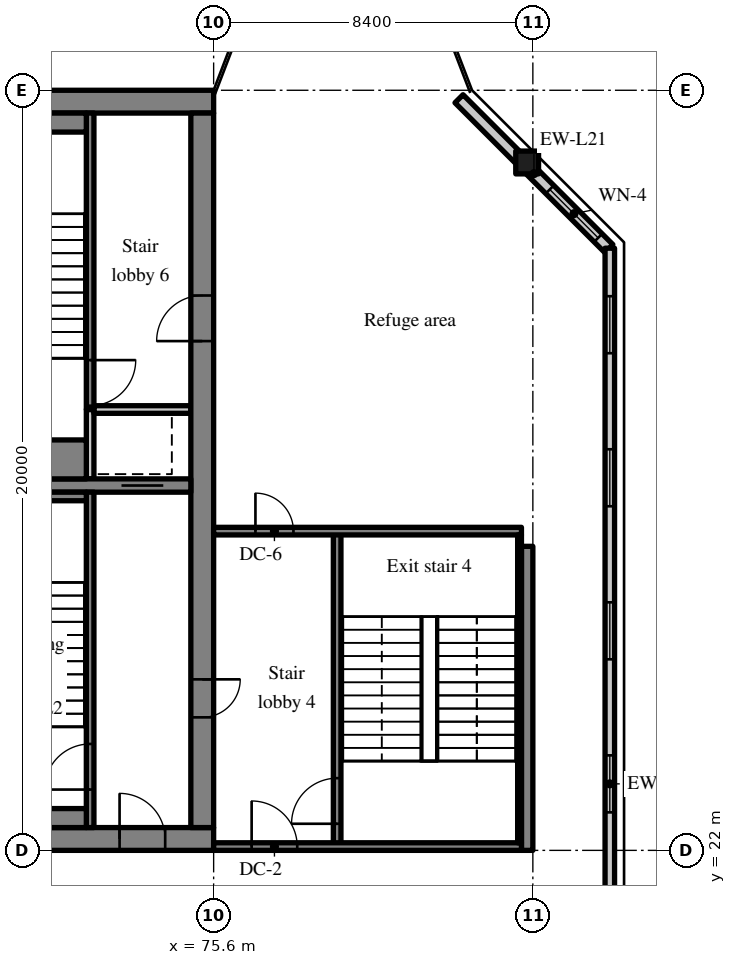
"""IFC4 building model, lengths in metres.
Left out: names, types, materials, properties, quantities, classifications, styles, units other than length and angle.
Written with IfcOpenShell. Run it as: python <this file> out.ifc"""

import sys

from ifc_helpers import new_model, si_unit, direction, frame, frame_2d, origin, origin_2d, place, context, subcontext, project, spatial, rectangle, extrude, source, transform, mapped, element, fill, save


model = new_model("IFC4")
c1 = context("Model", 3, precision=1e-05, world=origin(), true_north=direction((0.0, 1.0)))
c2 = subcontext(c1, "Body", "Model", "MODEL_VIEW")
j1 = project(units=[si_unit("LENGTHUNIT", "METRE"), si_unit("PLANEANGLEUNIT", "RADIAN")], contexts=[c1])
p1 = place(None, origin())
s1 = spatial("IfcSite", under=j1, at=p1, CompositionType="ELEMENT")
p2 = place(p1, origin())
s2 = spatial("IfcBuilding", under=s1, at=p2, CompositionType="ELEMENT")
p3 = place(p2, frame((0.0, 0.0, 221.8)))
s3 = spatial("IfcBuildingStorey", under=s2, at=p3, CompositionType="ELEMENT", Elevation=221.8)
m1 = source(origin(), c2, "Body", "SweptSolid", [
    extrude(rectangle(XDim=50.4, YDim=0.6, at=frame_2d((25.2, 0.0))), origin(), (0.0, 0.0, 1.0), 3.62),
])
p4 = place(p3, frame((25.2, 22.3, 0.0), z_axis=(0.0, 0.0, 1.0), x_axis=(1.0, 0.0, 0.0)))
e1 = element("IfcWall", 1, at=p4, inside=s3, PredefinedType="SHEAR", context=c2, shape_type="MappedRepresentation", body=[
    mapped(m1, transform((0.0, 0.0, 0.0), scale=1.0)),
])
m2 = source(origin(), c2, "Body", "SweptSolid", [
    extrude(rectangle(XDim=1.8, YDim=2.1, at=frame_2d((0.9, 1.05))), frame((0.0, 0.31, 0.0), z_axis=(0.0, -1.0, 0.0), x_axis=(1.0, 0.0, 0.0)), (0.0, 0.0, 1.0), 0.62),
])
p5 = place(p4, frame((15.9, 0.0, 0.0)))
e2 = element("IfcOpeningElement", 2, at=p5, cuts=e1, PredefinedType="OPENING", context=c2, shape_type="MappedRepresentation", body=[
    mapped(m2, transform((0.0, 0.0, 0.0), scale=1.0)),
])
m3 = source(origin(), c2, "Body", "SweptSolid", [
    extrude(rectangle(XDim=0.9, YDim=2.1, at=frame_2d((0.45, 1.05))), frame((0.0, 0.31, 0.0), z_axis=(0.0, -1.0, 0.0), x_axis=(1.0, 0.0, 0.0)), (0.0, 0.0, 1.0), 0.62),
])
p6 = place(p4, frame((9.687, 0.0, 0.0)))
e3 = element("IfcOpeningElement", 3, at=p6, cuts=e1, PredefinedType="OPENING", context=c2, shape_type="MappedRepresentation", body=[
    mapped(m3, transform((0.0, 0.0, 0.0), scale=1.0)),
])
p7 = place(p4, frame((21.513, 0.0, 0.0)))
e4 = element("IfcOpeningElement", 4, at=p7, cuts=e1, PredefinedType="OPENING", context=c2, shape_type="MappedRepresentation", body=[
    mapped(m3, transform((0.0, 0.0, 0.0), scale=1.0)),
])
p8 = place(p4, frame((32.7, 0.0, 0.0)))
e5 = element("IfcOpeningElement", 5, at=p8, cuts=e1, PredefinedType="OPENING", context=c2, shape_type="MappedRepresentation", body=[
    mapped(m2, transform((0.0, 0.0, 0.0), scale=1.0)),
])
m4 = source(origin(), c2, "Body", "SweptSolid", [
    extrude(rectangle(XDim=1.2, YDim=2.1, at=frame_2d((0.6, 1.05))), frame((0.0, 0.31, 0.0), z_axis=(0.0, -1.0, 0.0), x_axis=(1.0, 0.0, 0.0)), (0.0, 0.0, 1.0), 0.62),
])
p9 = place(p4, frame((6.488, 0.0, 0.0)))
e6 = element("IfcOpeningElement", 6, at=p9, cuts=e1, PredefinedType="OPENING", context=c2, shape_type="MappedRepresentation", body=[
    mapped(m4, transform((0.0, 0.0, 0.0), scale=1.0)),
])
p10 = place(p4, frame((47.925, 0.0, 0.0)))
e7 = element("IfcOpeningElement", 7, at=p10, cuts=e1, PredefinedType="OPENING", context=c2, shape_type="MappedRepresentation", body=[
    mapped(m4, transform((0.0, 0.0, 0.0), scale=1.0)),
])
p11 = place(p3, frame((25.2, 41.7, 0.0), z_axis=(0.0, 0.0, 1.0), x_axis=(1.0, 0.0, 0.0)))
e8 = element("IfcWall", 8, at=p11, inside=s3, PredefinedType="SHEAR", context=c2, shape_type="MappedRepresentation", body=[
    mapped(m1, transform((0.0, 0.0, 0.0), scale=1.0)),
])
m5 = source(origin(), c2, "Body", "SweptSolid", [
    extrude(rectangle(XDim=18.8, YDim=0.6, at=frame_2d((9.4, 0.0))), origin(), (0.0, 0.0, 1.0), 3.62),
])
p12 = place(p3, frame((75.3, 22.6, 0.0), z_axis=(0.0, 0.0, 1.0), x_axis=(0.0, 1.0, 0.0)))
e9 = element("IfcWall", 9, at=p12, inside=s3, PredefinedType="SHEAR", context=c2, shape_type="MappedRepresentation", body=[
    mapped(m5, transform((0.0, 0.0, 0.0), scale=1.0)),
])
m6 = source(origin(), c2, "Body", "SweptSolid", [
    extrude(rectangle(XDim=1.0, YDim=2.1, at=frame_2d((0.5, 1.05))), frame((0.0, 0.31, 0.0), z_axis=(0.0, -1.0, 0.0), x_axis=(1.0, 0.0, 0.0)), (0.0, 0.0, 1.0), 0.62),
])
p13 = place(p12, frame((2.9, 0.0, 0.0)))
e10 = element("IfcOpeningElement", 10, at=p13, cuts=e9, PredefinedType="OPENING", context=c2, shape_type="MappedRepresentation", body=[
    mapped(m6, transform((0.0, 0.0, 0.0), scale=1.0)),
])
p14 = place(p12, frame((12.8, 0.0, 0.0)))
e11 = element("IfcOpeningElement", 11, at=p14, cuts=e9, PredefinedType="OPENING", context=c2, shape_type="MappedRepresentation", body=[
    mapped(m4, transform((0.0, 0.0, 0.0), scale=1.0)),
])
m7 = source(origin(), c2, "Body", "SweptSolid", [
    extrude(rectangle(XDim=7.625, YDim=0.35, at=frame_2d((3.812, 0.0))), origin(), (0.0, 0.0, 1.0), 3.62),
])
p15 = place(p3, frame((67.375, 31.6, 0.0), z_axis=(0.0, 0.0, 1.0), x_axis=(1.0, 0.0, 0.0)))
e12 = element("IfcWall", 12, at=p15, inside=s3, PredefinedType="SHEAR", context=c2, shape_type="MappedRepresentation", body=[
    mapped(m7, transform((0.0, 0.0, 0.0), scale=1.0)),
])
m8 = source(origin(), c2, "Body", "SweptSolid", [
    extrude(rectangle(XDim=1.1, YDim=2.1, at=frame_2d((0.55, 1.05))), frame((0.0, 0.185, 0.0), z_axis=(0.0, -1.0, 0.0), x_axis=(1.0, 0.0, 0.0)), (0.0, 0.0, 1.0), 0.37),
])
p16 = place(p15, frame((5.8, 0.0, 0.0)))
e13 = element("IfcOpeningElement", 13, at=p16, cuts=e12, PredefinedType="OPENING", context=c2, shape_type="MappedRepresentation", body=[
    mapped(m8, transform((0.0, 0.0, 0.0), scale=1.0)),
])
m9 = source(origin(), c2, "Body", "SweptSolid", [
    extrude(rectangle(XDim=8.0, YDim=0.3, at=frame_2d((4.0, 0.0))), origin(), (0.0, 0.0, 1.0), 3.62),
])
p17 = place(p3, frame((83.85, 22.0, 0.0), z_axis=(0.0, 0.0, 1.0), x_axis=(0.0, 1.0, 0.0)))
e14 = element("IfcWall", 14, at=p17, inside=s3, PredefinedType="SHEAR", context=c2, shape_type="MappedRepresentation", body=[
    mapped(m9, transform((0.0, 0.0, 0.0), scale=1.0)),
])
m10 = source(origin(), c2, "Body", "SweptSolid", [
    extrude(rectangle(XDim=0.6, YDim=0.6, at=origin_2d()), origin(), (0.0, 0.0, 1.0), 3.62),
])
p18 = place(p3, frame((83.85, 40.1, 0.0), z_axis=(0.0, 0.0, 1.0), x_axis=(1.0, 0.0, 0.0)))
e15 = element("IfcColumn", 15, at=p18, inside=s3, PredefinedType="COLUMN", context=c2, shape_type="MappedRepresentation", body=[
    mapped(m10, transform((0.0, 0.0, 0.0), scale=1.0)),
])
m11 = source(origin(), c2, "Body", "SweptSolid", [
    extrude(rectangle(XDim=5.576, YDim=0.3, at=frame_2d((2.788, 0.0))), origin(), (0.0, 0.0, 1.0), 3.62),
])
p19 = place(p3, frame((86.0, 37.834, 0.0), z_axis=(0.0, 0.0, 1.0), x_axis=(-0.707106781187, 0.707106781187, 0.0)))
e16 = element("IfcWall", 16, at=p19, inside=s3, PredefinedType="SOLIDWALL", context=c2, shape_type="MappedRepresentation", body=[
    mapped(m11, transform((0.0, 0.0, 0.0), scale=1.0)),
])
m12 = source(origin(), c2, "Body", "SweptSolid", [
    extrude(rectangle(XDim=1.8, YDim=1.5, at=frame_2d((0.9, 0.75))), frame((0.0, 0.16, 0.0), z_axis=(0.0, -1.0, 0.0), x_axis=(1.0, 0.0, 0.0)), (0.0, 0.0, 1.0), 0.32),
])
p20 = place(p19, frame((0.399, 0.0, 0.9)))
e17 = element("IfcOpeningElement", 17, at=p20, cuts=e16, PredefinedType="OPENING", context=c2, shape_type="MappedRepresentation", body=[
    mapped(m12, transform((0.0, 0.0, 0.0), scale=1.0)),
])
m13 = source(origin(), c2, "Body", "SweptSolid", [
    extrude(rectangle(XDim=28.189, YDim=0.25, at=frame_2d((14.095, 0.0))), origin(), (0.0, 0.0, 1.0), 3.62),
])
p21 = place(p3, frame((86.025, 9.655, 0.0), z_axis=(0.0, 0.0, 1.0), x_axis=(0.0, 1.0, 0.0)))
e18 = element("IfcWall", 18, at=p21, inside=s3, PredefinedType="SOLIDWALL", context=c2, shape_type="MappedRepresentation", body=[
    mapped(m13, transform((0.0, 0.0, 0.0), scale=1.0)),
])
m14 = source(origin(), c2, "Body", "SweptSolid", [
    extrude(rectangle(XDim=1.5, YDim=1.5, at=frame_2d((0.75, 0.75))), frame((0.0, 0.135, 0.0), z_axis=(0.0, -1.0, 0.0), x_axis=(1.0, 0.0, 0.0)), (0.0, 0.0, 1.0), 0.27),
])
p22 = place(p21, frame((1.263, 0.0, 0.9)))
e19 = element("IfcOpeningElement", 19, at=p22, cuts=e18, PredefinedType="OPENING", context=c2, shape_type="MappedRepresentation", body=[
    mapped(m14, transform((0.0, 0.0, 0.0), scale=1.0)),
])
p23 = place(p21, frame((5.291, 0.0, 0.9)))
e20 = element("IfcOpeningElement", 20, at=p23, cuts=e18, PredefinedType="OPENING", context=c2, shape_type="MappedRepresentation", body=[
    mapped(m14, transform((0.0, 0.0, 0.0), scale=1.0)),
])
p24 = place(p21, frame((9.318, 0.0, 0.9)))
e21 = element("IfcOpeningElement", 21, at=p24, cuts=e18, PredefinedType="OPENING", context=c2, shape_type="MappedRepresentation", body=[
    mapped(m14, transform((0.0, 0.0, 0.0), scale=1.0)),
])
p25 = place(p21, frame((13.345, 0.0, 0.9)))
e22 = element("IfcOpeningElement", 22, at=p25, cuts=e18, PredefinedType="OPENING", context=c2, shape_type="MappedRepresentation", body=[
    mapped(m14, transform((0.0, 0.0, 0.0), scale=1.0)),
])
p26 = place(p21, frame((17.372, 0.0, 0.9)))
e23 = element("IfcOpeningElement", 23, at=p26, cuts=e18, PredefinedType="OPENING", context=c2, shape_type="MappedRepresentation", body=[
    mapped(m14, transform((0.0, 0.0, 0.0), scale=1.0)),
])
p27 = place(p21, frame((21.399, 0.0, 0.9)))
e24 = element("IfcOpeningElement", 24, at=p27, cuts=e18, PredefinedType="OPENING", context=c2, shape_type="MappedRepresentation", body=[
    mapped(m14, transform((0.0, 0.0, 0.0), scale=1.0)),
])
p28 = place(p21, frame((25.426, 0.0, 0.9)))
e25 = element("IfcOpeningElement", 25, at=p28, cuts=e18, PredefinedType="OPENING", context=c2, shape_type="MappedRepresentation", body=[
    mapped(m14, transform((0.0, 0.0, 0.0), scale=1.0)),
])
m15 = source(origin(), c2, "Body", "SweptSolid", [
    extrude(rectangle(XDim=8.825, YDim=0.2, at=frame_2d((4.413, 0.0))), origin(), (0.0, 0.0, 1.0), 3.62),
])
p29 = place(p3, frame((72.35, 22.6, 0.0), z_axis=(0.0, 0.0, 1.0), x_axis=(0.0, 1.0, 0.0)))
e26 = element("IfcWall", 26, at=p29, inside=s3, PredefinedType="SOLIDWALL", context=c2, shape_type="MappedRepresentation", body=[
    mapped(m15, transform((0.0, 0.0, 0.0), scale=1.0)),
])
m16 = source(origin(), c2, "Body", "SweptSolid", [
    extrude(rectangle(XDim=1.2, YDim=2.1, at=frame_2d((0.6, 1.05))), frame((0.0, 0.11, 0.0), z_axis=(0.0, -1.0, 0.0), x_axis=(1.0, 0.0, 0.0)), (0.0, 0.0, 1.0), 0.22),
])
p30 = place(p29, frame((1.0, 0.0, 0.0)))
e27 = element("IfcOpeningElement", 27, at=p30, cuts=e26, PredefinedType="OPENING", context=c2, shape_type="MappedRepresentation", body=[
    mapped(m16, transform((0.0, 0.0, 0.0), scale=1.0)),
])
m17 = source(origin(), c2, "Body", "SweptSolid", [
    extrude(rectangle(XDim=1.825, YDim=0.2, at=frame_2d((0.913, 0.0))), origin(), (0.0, 0.0, 1.0), 3.62),
])
p31 = place(p3, frame((72.35, 31.775, 0.0), z_axis=(0.0, 0.0, 1.0), x_axis=(0.0, 1.0, 0.0)))
e28 = element("IfcWall", 28, at=p31, inside=s3, PredefinedType="SOLIDWALL", context=c2, shape_type="MappedRepresentation", body=[
    mapped(m17, transform((0.0, 0.0, 0.0), scale=1.0)),
])
m18 = source(origin(), c2, "Body", "SweptSolid", [
    extrude(rectangle(XDim=2.55, YDim=0.2, at=frame_2d((1.275, 0.0))), origin(), (0.0, 0.0, 1.0), 3.62),
])
p32 = place(p3, frame((72.45, 33.6, 0.0), z_axis=(0.0, 0.0, 1.0), x_axis=(1.0, 0.0, 0.0)))
e29 = element("IfcWall", 29, at=p32, inside=s3, PredefinedType="SOLIDWALL", context=c2, shape_type="MappedRepresentation", body=[
    mapped(m18, transform((0.0, 0.0, 0.0), scale=1.0)),
])
m19 = source(origin(), c2, "Body", "SweptSolid", [
    extrude(rectangle(XDim=7.8, YDim=0.2, at=frame_2d((3.9, 0.0))), origin(), (0.0, 0.0, 1.0), 3.62),
])
p33 = place(p3, frame((72.35, 33.6, 0.0), z_axis=(0.0, 0.0, 1.0), x_axis=(0.0, 1.0, 0.0)))
e30 = element("IfcWall", 30, at=p33, inside=s3, PredefinedType="SOLIDWALL", context=c2, shape_type="MappedRepresentation", body=[
    mapped(m19, transform((0.0, 0.0, 0.0), scale=1.0)),
])
p34 = place(p33, frame((0.1, 0.0, 0.0)))
e31 = element("IfcOpeningElement", 31, at=p34, cuts=e30, PredefinedType="OPENING", context=c2, shape_type="MappedRepresentation", body=[
    mapped(m16, transform((0.0, 0.0, 0.0), scale=1.0)),
])
m20 = source(origin(), c2, "Body", "SweptSolid", [
    extrude(rectangle(XDim=8.3, YDim=0.2, at=frame_2d((4.15, 0.0))), origin(), (0.0, 0.0, 1.0), 3.62),
])
p35 = place(p3, frame((78.85, 22.1, 0.0), z_axis=(0.0, 0.0, 1.0), x_axis=(0.0, 1.0, 0.0)))
e32 = element("IfcWall", 32, at=p35, inside=s3, PredefinedType="SOLIDWALL", context=c2, shape_type="MappedRepresentation", body=[
    mapped(m20, transform((0.0, 0.0, 0.0), scale=1.0)),
])
p36 = place(p35, frame((0.6, 0.0, 0.0)))
e33 = element("IfcOpeningElement", 33, at=p36, cuts=e32, PredefinedType="OPENING", context=c2, shape_type="MappedRepresentation", body=[
    mapped(m16, transform((0.0, 0.0, 0.0), scale=1.0)),
])
m21 = source(origin(), c2, "Body", "SweptSolid", [
    extrude(rectangle(XDim=8.1, YDim=0.2, at=frame_2d((4.05, 0.0))), origin(), (0.0, 0.0, 1.0), 3.62),
])
p37 = place(p3, frame((83.7, 22.1, 0.0), z_axis=(0.0, 0.0, 1.0), x_axis=(-1.0, 0.0, 0.0)))
e34 = element("IfcWall", 34, at=p37, inside=s3, PredefinedType="SOLIDWALL", context=c2, shape_type="MappedRepresentation", body=[
    mapped(m21, transform((0.0, 0.0, 0.0), scale=1.0)),
])
p38 = place(p37, frame((5.9, 0.0, 0.0)))
e35 = element("IfcOpeningElement", 35, at=p38, cuts=e34, PredefinedType="OPENING", context=c2, shape_type="MappedRepresentation", body=[
    mapped(m16, transform((0.0, 0.0, 0.0), scale=1.0)),
])
p39 = place(p3, frame((83.7, 30.4, 0.0), z_axis=(0.0, 0.0, 1.0), x_axis=(-1.0, 0.0, 0.0)))
e36 = element("IfcWall", 36, at=p39, inside=s3, PredefinedType="SOLIDWALL", context=c2, shape_type="MappedRepresentation", body=[
    mapped(m21, transform((0.0, 0.0, 0.0), scale=1.0)),
])
m22 = source(origin(), c2, "Body", "SweptSolid", [
    extrude(rectangle(XDim=1.0, YDim=2.1, at=frame_2d((0.5, 1.05))), frame((0.0, 0.11, 0.0), z_axis=(0.0, -1.0, 0.0), x_axis=(1.0, 0.0, 0.0)), (0.0, 0.0, 1.0), 0.22),
])
p40 = place(p39, frame((6.0, 0.0, 0.0)))
e37 = element("IfcOpeningElement", 37, at=p40, cuts=e36, PredefinedType="OPENING", context=c2, shape_type="MappedRepresentation", body=[
    mapped(m22, transform((0.0, 0.0, 0.0), scale=1.0)),
])
m23 = source(origin(), c2, "Body", "SweptSolid", [
    extrude(rectangle(XDim=4.875, YDim=0.5, at=frame_2d((2.438, 0.0))), origin(), (0.0, 0.0, 1.0), 3.62),
])
p41 = place(p3, frame((67.375, 22.85, 0.0), z_axis=(0.0, 0.0, 1.0), x_axis=(1.0, 0.0, 0.0)))
e38 = element("IfcWall", 38, at=p41, inside=s3, PredefinedType="SOLIDWALL", context=c2, shape_type="MappedRepresentation", body=[
    mapped(m23, transform((0.0, 0.0, 0.0), scale=1.0)),
])
m24 = source(origin(), c2, "Body", "SweptSolid", [
    extrude(rectangle(XDim=4.875, YDim=0.225, at=frame_2d((2.438, 0.0))), origin(), (0.0, 0.0, 1.0), 3.62),
])
p42 = place(p3, frame((67.375, 31.312, 0.0), z_axis=(0.0, 0.0, 1.0), x_axis=(1.0, 0.0, 0.0)))
e39 = element("IfcWall", 39, at=p42, inside=s3, PredefinedType="SOLIDWALL", context=c2, shape_type="MappedRepresentation", body=[
    mapped(m24, transform((0.0, 0.0, 0.0), scale=1.0)),
])
p43 = place(p3, frame((67.375, 41.15, 0.0), z_axis=(0.0, 0.0, 1.0), x_axis=(1.0, 0.0, 0.0)))
e40 = element("IfcWall", 40, at=p43, inside=s3, PredefinedType="SOLIDWALL", context=c2, shape_type="MappedRepresentation", body=[
    mapped(m23, transform((0.0, 0.0, 0.0), scale=1.0)),
])
m25 = source(origin(), c2, "Body", "SweptSolid", [
    extrude(rectangle(XDim=4.875, YDim=1.025, at=frame_2d((2.438, 0.0))), origin(), (0.0, 0.0, 1.0), 3.62),
])
p44 = place(p3, frame((67.375, 32.287, 0.0), z_axis=(0.0, 0.0, 1.0), x_axis=(1.0, 0.0, 0.0)))
e41 = element("IfcWall", 41, at=p44, inside=s3, PredefinedType="SOLIDWALL", context=c2, shape_type="MappedRepresentation", body=[
    mapped(m25, transform((0.0, 0.0, 0.0), scale=1.0)),
])
m26 = source(origin(), c2, "Body", "SweptSolid", [
    extrude(rectangle(XDim=8.1, YDim=0.1, at=frame_2d((4.05, 0.0))), origin(), (0.0, 0.0, 1.0), 3.62),
])
p45 = place(p3, frame((83.65, 22.2, 0.0), z_axis=(0.0, 0.0, 1.0), x_axis=(0.0, 1.0, 0.0)))
e42 = element("IfcWall", 42, at=p45, inside=s3, PredefinedType="SOLIDWALL", context=c2, shape_type="MappedRepresentation", body=[
    mapped(m26, transform((0.0, 0.0, 0.0), scale=1.0)),
])
m27 = source(origin(), c2, "Body", "SweptSolid", [
    extrude(rectangle(XDim=1.8, YDim=1.5, at=frame_2d((0.9, 0.75))), frame((0.0, 0.03, 0.0), z_axis=(0.0, -1.0, 0.0), x_axis=(1.0, 0.0, 0.0)), (0.0, 0.0, 1.0), 0.06),
])
p46 = place(p20, origin())
e43 = element("IfcWindow", 43, at=p46, inside=s3, PartitioningType="SINGLE_PANEL", PredefinedType="WINDOW", context=c2, shape_type="MappedRepresentation", body=[
    mapped(m27, transform((0.0, 0.0, 0.0), scale=1.0)),
])
fill(e17, e43)
m28 = source(origin(), c2, "Body", "SweptSolid", [
    extrude(rectangle(XDim=1.5, YDim=1.5, at=frame_2d((0.75, 0.75))), frame((0.0, 0.03, 0.0), z_axis=(0.0, -1.0, 0.0), x_axis=(1.0, 0.0, 0.0)), (0.0, 0.0, 1.0), 0.06),
])
p47 = place(p25, origin())
e44 = element("IfcWindow", 44, at=p47, inside=s3, PartitioningType="SINGLE_PANEL", PredefinedType="WINDOW", context=c2, shape_type="MappedRepresentation", body=[
    mapped(m28, transform((0.0, 0.0, 0.0), scale=1.0)),
])
fill(e22, e44)
p48 = place(p26, origin())
e45 = element("IfcWindow", 45, at=p48, inside=s3, PartitioningType="SINGLE_PANEL", PredefinedType="WINDOW", context=c2, shape_type="MappedRepresentation", body=[
    mapped(m28, transform((0.0, 0.0, 0.0), scale=1.0)),
])
fill(e23, e45)
p49 = place(p27, origin())
e46 = element("IfcWindow", 46, at=p49, inside=s3, PartitioningType="SINGLE_PANEL", PredefinedType="WINDOW", context=c2, shape_type="MappedRepresentation", body=[
    mapped(m28, transform((0.0, 0.0, 0.0), scale=1.0)),
])
fill(e24, e46)
p50 = place(p28, origin())
e47 = element("IfcWindow", 47, at=p50, inside=s3, PartitioningType="SINGLE_PANEL", PredefinedType="WINDOW", context=c2, shape_type="MappedRepresentation", body=[
    mapped(m28, transform((0.0, 0.0, 0.0), scale=1.0)),
])
fill(e25, e47)
m29 = source(origin(), c2, "Body", "SweptSolid", [
    extrude(rectangle(XDim=1.2, YDim=2.1, at=frame_2d((0.6, 1.05))), frame((0.0, 0.025, 0.0), z_axis=(0.0, -1.0, 0.0), x_axis=(1.0, 0.0, 0.0)), (0.0, 0.0, 1.0), 0.05),
])
p51 = place(p30, origin())
e48 = element("IfcDoor", 48, at=p51, inside=s3, OperationType="SINGLE_SWING_LEFT", PredefinedType="DOOR", context=c2, shape_type="MappedRepresentation", body=[
    mapped(m29, transform((0.0, 0.0, 0.0), scale=1.0)),
])
fill(e27, e48)
m30 = source(origin(), c2, "Body", "SweptSolid", [
    extrude(rectangle(XDim=1.2, YDim=2.1, at=frame_2d((0.6, 1.05))), frame((0.0, 0.225, 0.0), z_axis=(0.0, -1.0, 0.0), x_axis=(1.0, 0.0, 0.0)), (0.0, 0.0, 1.0), 0.05),
])
p52 = place(p10, origin())
e49 = element("IfcDoor", 49, at=p52, inside=s3, OperationType="SINGLE_SWING_LEFT", PredefinedType="DOOR", context=c2, shape_type="MappedRepresentation", body=[
    mapped(m30, transform((0.0, 0.0, 0.0), scale=1.0)),
])
fill(e7, e49)
m31 = source(origin(), c2, "Body", "SweptSolid", [
    extrude(rectangle(XDim=1.1, YDim=2.1, at=frame_2d((0.55, 1.05))), frame((0.0, 0.025, 0.0), z_axis=(0.0, -1.0, 0.0), x_axis=(1.0, 0.0, 0.0)), (0.0, 0.0, 1.0), 0.05),
])
p53 = place(p16, origin())
e50 = element("IfcDoor", 50, at=p53, inside=s3, OperationType="SLIDING_TO_LEFT", PredefinedType="DOOR", context=c2, shape_type="MappedRepresentation", body=[
    mapped(m31, transform((0.0, 0.0, 0.0), scale=1.0)),
])
fill(e13, e50)
m32 = source(origin(), c2, "Body", "SweptSolid", [
    extrude(rectangle(XDim=1.0, YDim=2.1, at=frame_2d((0.5, 1.05))), frame((0.0, 0.025, 0.0), z_axis=(0.0, -1.0, 0.0), x_axis=(1.0, 0.0, 0.0)), (0.0, 0.0, 1.0), 0.05),
])
p54 = place(p13, origin())
e51 = element("IfcDoor", 51, at=p54, inside=s3, OperationType="SINGLE_SWING_RIGHT", PredefinedType="DOOR", context=c2, shape_type="MappedRepresentation", body=[
    mapped(m32, transform((0.0, 0.0, 0.0), scale=1.0)),
])
fill(e10, e51)
p55 = place(p34, origin())
e52 = element("IfcDoor", 52, at=p55, inside=s3, OperationType="SINGLE_SWING_RIGHT", PredefinedType="DOOR", context=c2, shape_type="MappedRepresentation", body=[
    mapped(m29, transform((0.0, 0.0, 0.0), scale=1.0)),
])
fill(e31, e52)
p56 = place(p14, origin())
e53 = element("IfcDoor", 53, at=p56, inside=s3, OperationType="SINGLE_SWING_LEFT", PredefinedType="DOOR", context=c2, shape_type="MappedRepresentation", body=[
    mapped(m29, transform((0.0, 0.0, 0.0), scale=1.0)),
])
fill(e11, e53)
p57 = place(p36, origin())
e54 = element("IfcDoor", 54, at=p57, inside=s3, OperationType="SINGLE_SWING_LEFT", PredefinedType="DOOR", context=c2, shape_type="MappedRepresentation", body=[
    mapped(m29, transform((0.0, 0.0, 0.0), scale=1.0)),
])
fill(e33, e54)
p58 = place(p38, origin())
e55 = element("IfcDoor", 55, at=p58, inside=s3, OperationType="SINGLE_SWING_RIGHT", PredefinedType="DOOR", context=c2, shape_type="MappedRepresentation", body=[
    mapped(m29, transform((0.0, 0.0, 0.0), scale=1.0)),
])
fill(e35, e55)
p59 = place(p40, origin())
e56 = element("IfcDoor", 56, at=p59, inside=s3, OperationType="SINGLE_SWING_RIGHT", PredefinedType="DOOR", context=c2, shape_type="MappedRepresentation", body=[
    mapped(m32, transform((0.0, 0.0, 0.0), scale=1.0)),
])
fill(e37, e56)
save(model, sys.argv[1])
